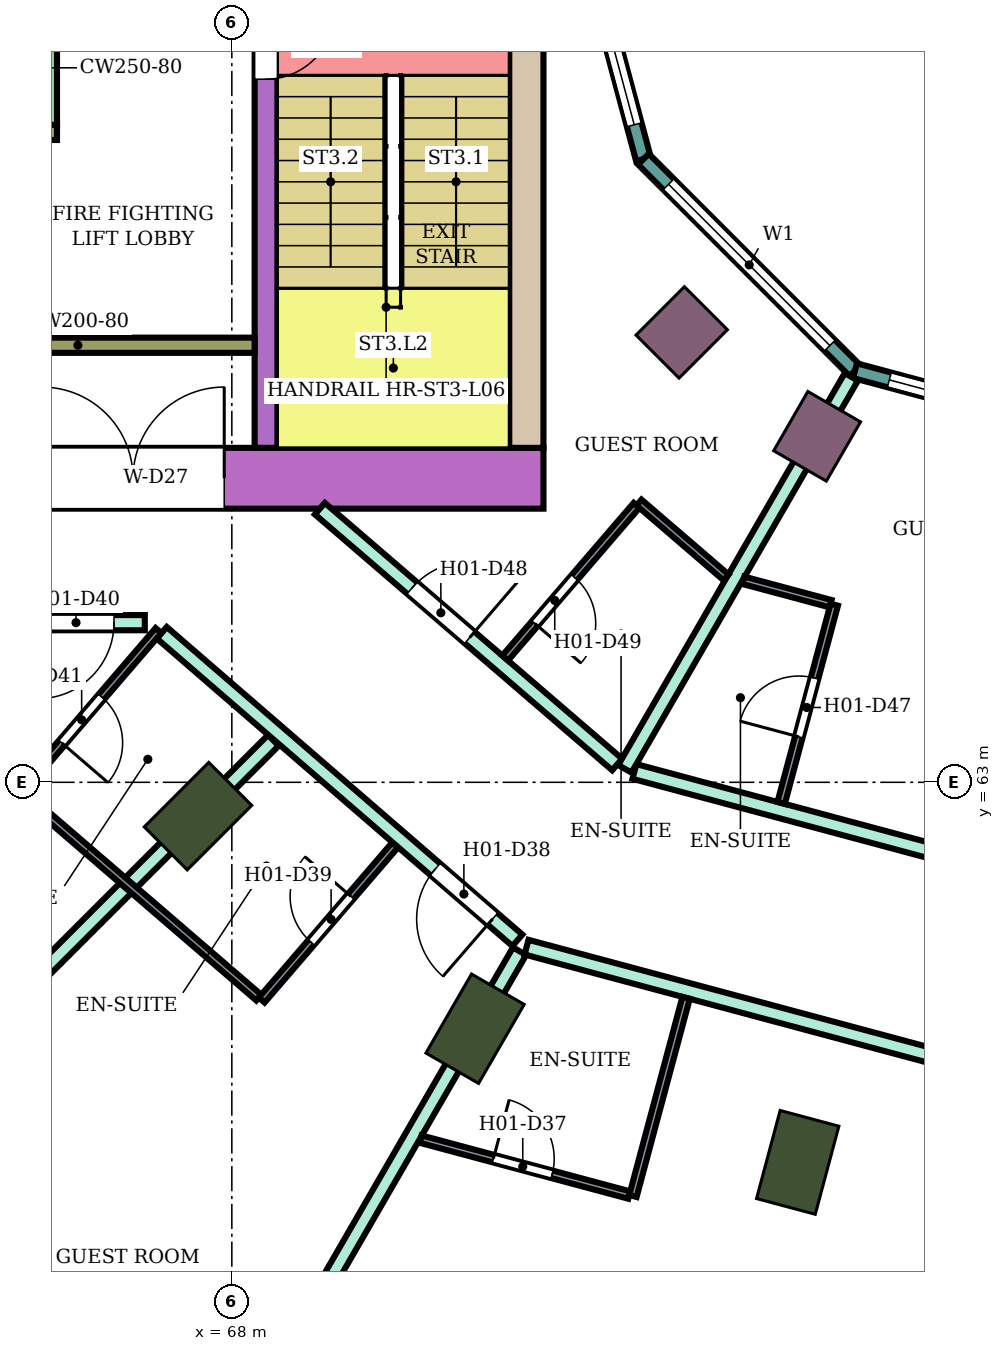
"""IFC4 building model, lengths in metres.
Left out: names, types, materials, properties, quantities, classifications, styles, units other than length and angle.
Written with IfcOpenShell. Run it as: python <this file> out.ifc"""

import sys

from ifc_helpers import new_model, si_unit, direction, frame, frame_2d, origin, origin_2d, place, context, subcontext, project, spatial, rectangle, extrude, element, fill, save


model = new_model("IFC4")
c1 = context("Model", 3, precision=1e-05, world=origin(), true_north=direction((0.0, 1.0)))
c2 = subcontext(c1, "Body", "Model", "MODEL_VIEW")
j1 = project(units=[si_unit("LENGTHUNIT", "METRE"), si_unit("PLANEANGLEUNIT", "RADIAN")], contexts=[c1])
p1 = place(None, origin())
s1 = spatial("IfcSite", under=j1, at=p1, CompositionType="ELEMENT")
p2 = place(p1, origin())
s2 = spatial("IfcBuilding", under=s1, at=p2, CompositionType="ELEMENT")
p3 = place(p2, frame((0.0, 0.0, 32.6)))
s3 = spatial("IfcBuildingStorey", under=s2, at=p3, CompositionType="ELEMENT", Elevation=32.6)
for number, where, z_axis, x_axis in (
    (1, (67.555, 62.555, 0.0), (0.0, 0.0, 1.0), (-0.707, -0.707, 0.0)),
    (2, (71.2, 59.758, 0.0), (0.0, 0.0, 1.0), (-0.5, -0.866, 0.0)),
    (3, (75.445, 58.0, 0.0), (0.0, 0.0, 1.0), (-0.259, -0.966, 0.0)),
):
    element("IfcColumn", number, at=place(p3, frame(where, z_axis=z_axis, x_axis=x_axis)), inside=s3, PredefinedType="COLUMN", context=c2, shape_type="SweptSolid", body=[
        extrude(rectangle(XDim=1.2, YDim=0.8, at=origin_2d()), origin(), (0.0, 0.0, 1.0), 3.8),
    ])
for number, where, z_axis, x_axis in (
    (4, (73.919, 68.919, 0.0), (0.0, 0.0, 1.0), (-0.707, -0.707, 0.0)),
    (5, (75.7, 67.552, 0.0), (0.0, 0.0, 1.0), (-0.5, -0.866, 0.0)),
):
    element("IfcColumn", number, at=place(p3, frame(where, z_axis=z_axis, x_axis=x_axis)), inside=s3, PredefinedType="COLUMN", context=c2, shape_type="SweptSolid", body=[
        extrude(rectangle(XDim=0.9, YDim=0.8, at=origin_2d()), origin(), (0.0, 0.0, 1.0), 3.8),
    ])
p4 = place(p3, frame((72.1, 67.0, 0.0), z_axis=(0.0, 0.0, 1.0), x_axis=(-1.0, 0.0, 0.0)))
e6 = element("IfcWall", 6, at=p4, inside=s3, PredefinedType="SHEAR", context=c2, shape_type="SweptSolid", body=[
    extrude(rectangle(XDim=14.7, YDim=0.8, at=frame_2d((7.35, 0.0))), origin(), (0.0, 0.0, 1.0), 3.48),
])
p5 = place(p4, frame((4.2, 0.0, 0.0)))
e7 = element("IfcOpeningElement", 7, at=p5, cuts=e6, PredefinedType="OPENING", context=c2, shape_type="SweptSolid", body=[
    extrude(rectangle(XDim=2.4, YDim=2.4, at=frame_2d((1.2, 1.2))), frame((0.0, 0.41, 0.0), z_axis=(0.0, -1.0, 0.0), x_axis=(1.0, 0.0, 0.0)), (0.0, 0.0, 1.0), 0.82),
])
p6 = place(p3, frame((71.875, 75.0, 0.0), z_axis=(0.0, 0.0, 1.0), x_axis=(0.0, -1.0, 0.0)))
e8 = element("IfcWall", 8, at=p6, inside=s3, PredefinedType="SHEAR", context=c2, shape_type="SweptSolid", body=[
    extrude(rectangle(XDim=7.6, YDim=0.45, at=frame_2d((3.8, 0.0))), origin(), (0.0, 0.0, 1.0), 3.48),
])
p7 = place(p3, frame((68.45, 75.0, 0.0), z_axis=(0.0, 0.0, 1.0), x_axis=(0.0, -1.0, 0.0)))
e9 = element("IfcWall", 9, at=p7, inside=s3, PredefinedType="SHEAR", context=c2, shape_type="SweptSolid", body=[
    extrude(rectangle(XDim=7.6, YDim=0.3, at=frame_2d((3.8, 0.0))), origin(), (0.0, 0.0, 1.0), 3.48),
])
p8 = place(p7, frame((1.85, 0.0, 0.0)))
e10 = element("IfcOpeningElement", 10, at=p8, cuts=e9, PredefinedType="OPENING", context=c2, shape_type="SweptSolid", body=[
    extrude(rectangle(XDim=0.9, YDim=2.1, at=frame_2d((0.45, 1.05))), frame((0.0, 0.16, 0.0), z_axis=(0.0, -1.0, 0.0), x_axis=(1.0, 0.0, 0.0)), (0.0, 0.0, 1.0), 0.32),
])
p9 = place(p3, frame((68.3, 68.75, 0.0), z_axis=(0.0, 0.0, 1.0), x_axis=(-1.0, 0.0, 0.0)))
e11 = element("IfcWall", 11, at=p9, inside=s3, PredefinedType="SHEAR", context=c2, shape_type="SweptSolid", body=[
    extrude(rectangle(XDim=4.65, YDim=0.2, at=frame_2d((2.325, 0.0))), origin(), (0.0, 0.0, 1.0), 3.48),
])
p10 = place(p3, frame((65.7, 71.55, 0.0), z_axis=(0.0, 0.0, 1.0), x_axis=(-1.0, 0.0, 0.0)))
e12 = element("IfcWall", 12, at=p10, inside=s3, PredefinedType="SHEAR", context=c2, shape_type="SweptSolid", body=[
    extrude(rectangle(XDim=2.05, YDim=0.2, at=frame_2d((1.025, 0.0))), origin(), (0.0, 0.0, 1.0), 3.48),
])
p11 = place(p3, frame((65.575, 73.15, 0.0), z_axis=(0.0, 0.0, 1.0), x_axis=(0.0, -1.0, 0.0)))
e13 = element("IfcWall", 13, at=p11, inside=s3, PredefinedType="SHEAR", context=c2, shape_type="SweptSolid", body=[
    extrude(rectangle(XDim=1.5, YDim=0.25, at=frame_2d((0.75, 0.0))), origin(), (0.0, 0.0, 1.0), 3.48),
])
p12 = place(p3, frame((72.396, 75.0, 0.0), z_axis=(0.0, 0.0, 1.0), x_axis=(0.258789828301, -0.965933654434, 0.0)))
e14 = element("IfcWall", 14, at=p12, inside=s3, PredefinedType="NOTDEFINED", context=c2, shape_type="SweptSolid", body=[
    extrude(rectangle(XDim=3.936, YDim=0.2, at=frame_2d((1.968, 0.0))), origin(), (0.0, 0.0, 1.0), 3.8),
])
p13 = place(p12, frame((0.468, 0.0, 0.9)))
e15 = element("IfcOpeningElement", 15, at=p13, cuts=e14, PredefinedType="OPENING", context=c2, shape_type="SweptSolid", body=[
    extrude(rectangle(XDim=3.0, YDim=2.3, at=frame_2d((1.5, 1.15))), frame((0.0, 0.11, 0.0), z_axis=(0.0, -1.0, 0.0), x_axis=(1.0, 0.0, 0.0)), (0.0, 0.0, 1.0), 0.22),
])
p14 = place(p3, frame((73.415, 71.198, 0.0), z_axis=(0.0, 0.0, 1.0), x_axis=(0.707106781187, -0.707106781187, 0.0)))
e16 = element("IfcWall", 16, at=p14, inside=s3, PredefinedType="NOTDEFINED", context=c2, shape_type="SweptSolid", body=[
    extrude(rectangle(XDim=3.936, YDim=0.2, at=frame_2d((1.968, 0.0))), origin(), (0.0, 0.0, 1.0), 3.8),
])
p15 = place(p14, frame((0.468, 0.0, 0.9)))
e17 = element("IfcOpeningElement", 17, at=p15, cuts=e16, PredefinedType="OPENING", context=c2, shape_type="SweptSolid", body=[
    extrude(rectangle(XDim=3.0, YDim=2.3, at=frame_2d((1.5, 1.15))), frame((0.0, 0.11, 0.0), z_axis=(0.0, -1.0, 0.0), x_axis=(1.0, 0.0, 0.0)), (0.0, 0.0, 1.0), 0.22),
])
p16 = place(p3, frame((76.198, 68.415, 0.0), z_axis=(0.0, 0.0, 1.0), x_axis=(0.965933654434, -0.258789828301, 0.0)))
e18 = element("IfcWall", 18, at=p16, inside=s3, PredefinedType="NOTDEFINED", context=c2, shape_type="SweptSolid", body=[
    extrude(rectangle(XDim=3.936, YDim=0.2, at=frame_2d((1.968, 0.0))), origin(), (0.0, 0.0, 1.0), 3.8),
])
p17 = place(p16, frame((0.468, 0.0, 0.9)))
e19 = element("IfcOpeningElement", 19, at=p17, cuts=e18, PredefinedType="OPENING", context=c2, shape_type="SweptSolid", body=[
    extrude(rectangle(XDim=3.0, YDim=2.3, at=frame_2d((1.5, 1.15))), frame((0.0, 0.11, 0.0), z_axis=(0.0, -1.0, 0.0), x_axis=(1.0, 0.0, 0.0)), (0.0, 0.0, 1.0), 0.22),
])
p18 = place(p3, frame((63.592, 58.599, 0.0), z_axis=(0.0, 0.0, 1.0), x_axis=(0.707228748718, 0.706984792613, 0.0)))
e20 = element("IfcWall", 20, at=p18, inside=s3, PredefinedType="PARTITIONING", context=c2, shape_type="SweptSolid", body=[
    extrude(rectangle(XDim=7.005, YDim=0.2, at=frame_2d((3.503, 0.0))), origin(), (0.0, 0.0, 1.0), 3.35),
])
p19 = place(p3, frame((65.2, 65.1, 0.0), z_axis=(0.0, 0.0, 1.0), x_axis=(1.0, 0.0, 0.0)))
e21 = element("IfcWall", 21, at=p19, inside=s3, PredefinedType="PARTITIONING", context=c2, shape_type="SweptSolid", body=[
    extrude(rectangle(XDim=1.655, YDim=0.2, at=frame_2d((0.828, 0.0))), origin(), (0.0, 0.0, 1.0), 3.35),
])
p20 = place(p19, frame((0.25, 0.0, 0.0)))
e22 = element("IfcOpeningElement", 22, at=p20, cuts=e21, PredefinedType="OPENING", context=c2, shape_type="SweptSolid", body=[
    extrude(rectangle(XDim=1.0, YDim=2.1, at=frame_2d((0.5, 1.05))), frame((0.0, 0.11, 0.0), z_axis=(0.0, -1.0, 0.0), x_axis=(1.0, 0.0, 0.0)), (0.0, 0.0, 1.0), 0.22),
])
p21 = place(p3, frame((67.078, 64.968, 0.0), z_axis=(0.0, 0.0, 1.0), x_axis=(0.756371089567, -0.654142778656, 0.0)))
e23 = element("IfcWall", 23, at=p21, inside=s3, PredefinedType="PARTITIONING", context=c2, shape_type="SweptSolid", body=[
    extrude(rectangle(XDim=6.185, YDim=0.2, at=frame_2d((3.093, 0.0))), origin(), (0.0, 0.0, 1.0), 3.35),
])
p22 = place(p21, frame((4.755, 0.0, 0.0)))
e24 = element("IfcOpeningElement", 24, at=p22, cuts=e23, PredefinedType="OPENING", context=c2, shape_type="SweptSolid", body=[
    extrude(rectangle(XDim=1.0, YDim=2.1, at=frame_2d((0.5, 1.05))), frame((0.0, 0.11, 0.0), z_axis=(0.0, -1.0, 0.0), x_axis=(1.0, 0.0, 0.0)), (0.0, 0.0, 1.0), 0.22),
])
p23 = place(p3, frame((67.096, 52.662, 0.0), z_axis=(0.0, 0.0, 1.0), x_axis=(0.500242450002, 0.865885379953, 0.0)))
e25 = element("IfcWall", 25, at=p23, inside=s3, PredefinedType="PARTITIONING", context=c2, shape_type="SweptSolid", body=[
    extrude(rectangle(XDim=9.374, YDim=0.2, at=frame_2d((4.687, 0.0))), origin(), (0.0, 0.0, 1.0), 3.35),
])
p24 = place(p3, frame((69.158, 66.6, 0.0), z_axis=(0.0, 0.0, 1.0), x_axis=(0.757976058094, -0.652282373943, 0.0)))
e26 = element("IfcWall", 26, at=p24, inside=s3, PredefinedType="PARTITIONING", context=c2, shape_type="SweptSolid", body=[
    extrude(rectangle(XDim=5.16, YDim=0.2, at=frame_2d((2.58, 0.0))), origin(), (0.0, 0.0, 1.0), 3.35),
])
p25 = place(p24, frame((1.6, 0.0, 0.0)))
e27 = element("IfcOpeningElement", 27, at=p25, cuts=e26, PredefinedType="OPENING", context=c2, shape_type="SweptSolid", body=[
    extrude(rectangle(XDim=1.0, YDim=2.1, at=frame_2d((0.5, 1.05))), frame((0.0, 0.11, 0.0), z_axis=(0.0, -1.0, 0.0), x_axis=(1.0, 0.0, 0.0)), (0.0, 0.0, 1.0), 0.22),
])
p26 = place(p3, frame((71.877, 60.831, 0.0), z_axis=(0.0, 0.0, 1.0), x_axis=(0.965852509869, -0.259092510851, 0.0)))
e28 = element("IfcWall", 28, at=p26, inside=s3, PredefinedType="PARTITIONING", context=c2, shape_type="SweptSolid", body=[
    extrude(rectangle(XDim=8.32, YDim=0.2, at=frame_2d((4.16, 0.0))), origin(), (0.0, 0.0, 1.0), 3.35),
])
p27 = place(p26, frame((6.86, 0.0, 0.0)))
e29 = element("IfcOpeningElement", 29, at=p27, cuts=e28, PredefinedType="OPENING", context=c2, shape_type="SweptSolid", body=[
    extrude(rectangle(XDim=1.0, YDim=2.1, at=frame_2d((0.5, 1.05))), frame((0.0, 0.11, 0.0), z_axis=(0.0, -1.0, 0.0), x_axis=(1.0, 0.0, 0.0)), (0.0, 0.0, 1.0), 0.22),
])
p28 = place(p3, frame((73.297, 63.143, 0.0), z_axis=(0.0, 0.0, 1.0), x_axis=(0.965859030528, -0.25906820173, 0.0)))
e30 = element("IfcWall", 30, at=p28, inside=s3, PredefinedType="PARTITIONING", context=c2, shape_type="SweptSolid", body=[
    extrude(rectangle(XDim=6.81, YDim=0.2, at=frame_2d((3.405, 0.0))), origin(), (0.0, 0.0, 1.0), 3.35),
])
p29 = place(p28, frame((5.39, 0.0, 0.0)))
e31 = element("IfcOpeningElement", 31, at=p29, cuts=e30, PredefinedType="OPENING", context=c2, shape_type="SweptSolid", body=[
    extrude(rectangle(XDim=1.0, YDim=2.1, at=frame_2d((0.5, 1.05))), frame((0.0, 0.11, 0.0), z_axis=(0.0, -1.0, 0.0), x_axis=(1.0, 0.0, 0.0)), (0.0, 0.0, 1.0), 0.22),
])
p30 = place(p3, frame((73.171, 63.177, 0.0), z_axis=(0.0, 0.0, 1.0), x_axis=(0.500257106344, 0.865876912472, 0.0)))
e32 = element("IfcWall", 32, at=p30, inside=s3, PredefinedType="PARTITIONING", context=c2, shape_type="SweptSolid", body=[
    extrude(rectangle(XDim=5.955, YDim=0.2, at=frame_2d((2.978, 0.0))), origin(), (0.0, 0.0, 1.0), 3.35),
])
p31 = place(p3, frame((65.242, 62.912, 0.0), z_axis=(0.0, 0.0, 1.0), x_axis=(0.652069888227, 0.758158862553, 0.0)))
e33 = element("IfcWall", 33, at=p31, inside=s3, PredefinedType="PARTITIONING", context=c2, shape_type="SweptSolid", body=[
    extrude(rectangle(XDim=2.75, YDim=0.1, at=frame_2d((1.375, 0.0))), origin(), (0.0, 0.0, 1.0), 3.35),
])
p32 = place(p31, frame((0.8, 0.0, 0.0)))
e34 = element("IfcOpeningElement", 34, at=p32, cuts=e33, PredefinedType="OPENING", context=c2, shape_type="SweptSolid", body=[
    extrude(rectangle(XDim=0.8, YDim=2.1, at=frame_2d((0.4, 1.05))), frame((0.0, 0.06, 0.0), z_axis=(0.0, -1.0, 0.0), x_axis=(1.0, 0.0, 0.0)), (0.0, 0.0, 1.0), 0.12),
])
p33 = place(p3, frame((65.209, 62.875, 0.0), z_axis=(0.0, 0.0, 1.0), x_axis=(0.757930378138, -0.652335451969, 0.0)))
e35 = element("IfcWall", 35, at=p33, inside=s3, PredefinedType="PARTITIONING", context=c2, shape_type="SweptSolid", body=[
    extrude(rectangle(XDim=4.15, YDim=0.1, at=frame_2d((2.075, 0.0))), origin(), (0.0, 0.0, 1.0), 3.35),
])
p34 = place(p3, frame((68.393, 60.135, 0.0), z_axis=(0.0, 0.0, 1.0), x_axis=(0.652061182569, 0.758166349944, 0.0)))
e36 = element("IfcWall", 36, at=p34, inside=s3, PredefinedType="PARTITIONING", context=c2, shape_type="SweptSolid", body=[
    extrude(rectangle(XDim=2.69, YDim=0.1, at=frame_2d((1.345, 0.0))), origin(), (0.0, 0.0, 1.0), 3.35),
])
p35 = place(p34, frame((1.0, 0.0, 0.0)))
e37 = element("IfcOpeningElement", 37, at=p35, cuts=e36, PredefinedType="OPENING", context=c2, shape_type="SweptSolid", body=[
    extrude(rectangle(XDim=0.8, YDim=2.1, at=frame_2d((0.4, 1.05))), frame((0.0, 0.06, 0.0), z_axis=(0.0, -1.0, 0.0), x_axis=(1.0, 0.0, 0.0)), (0.0, 0.0, 1.0), 0.12),
])
p36 = place(p3, frame((70.484, 58.305, 0.0), z_axis=(0.0, 0.0, 1.0), x_axis=(0.965904703781, -0.258897862512, 0.0)))
e38 = element("IfcWall", 38, at=p36, inside=s3, PredefinedType="PARTITIONING", context=c2, shape_type="SweptSolid", body=[
    extrude(rectangle(XDim=2.841, YDim=0.1, at=frame_2d((1.421, 0.0))), origin(), (0.0, 0.0, 1.0), 3.35),
])
p37 = place(p36, frame((0.99, 0.0, 0.0)))
e39 = element("IfcOpeningElement", 39, at=p37, cuts=e38, PredefinedType="OPENING", context=c2, shape_type="SweptSolid", body=[
    extrude(rectangle(XDim=0.8, YDim=2.1, at=frame_2d((0.4, 1.05))), frame((0.0, 0.06, 0.0), z_axis=(0.0, -1.0, 0.0), x_axis=(1.0, 0.0, 0.0)), (0.0, 0.0, 1.0), 0.12),
])
p38 = place(p3, frame((71.596, 64.635, 0.0), z_axis=(0.0, 0.0, 1.0), x_axis=(0.652285007511, 0.757973791748, 0.0)))
e40 = element("IfcWall", 40, at=p38, inside=s3, PredefinedType="PARTITIONING", context=c2, shape_type="SweptSolid", body=[
    extrude(rectangle(XDim=2.65, YDim=0.1, at=frame_2d((1.325, 0.0))), origin(), (0.0, 0.0, 1.0), 3.35),
])
p39 = place(p38, frame((0.6, 0.0, 0.0)))
e41 = element("IfcOpeningElement", 41, at=p39, cuts=e40, PredefinedType="OPENING", context=c2, shape_type="SweptSolid", body=[
    extrude(rectangle(XDim=0.8, YDim=2.1, at=frame_2d((0.4, 1.05))), frame((0.0, 0.06, 0.0), z_axis=(0.0, -1.0, 0.0), x_axis=(1.0, 0.0, 0.0)), (0.0, 0.0, 1.0), 0.12),
])
p40 = place(p3, frame((73.277, 57.557, 0.0), z_axis=(0.0, 0.0, 1.0), x_axis=(0.258928960762, 0.965896367774, 0.0)))
e42 = element("IfcWall", 42, at=p40, inside=s3, PredefinedType="PARTITIONING", context=c2, shape_type="SweptSolid", body=[
    extrude(rectangle(XDim=2.699, YDim=0.1, at=frame_2d((1.35, 0.0))), origin(), (0.0, 0.0, 1.0), 3.35),
])
p41 = place(p3, frame((73.357, 66.681, 0.0), z_axis=(0.0, 0.0, 1.0), x_axis=(0.758263469747, -0.651948242154, 0.0)))
e43 = element("IfcWall", 43, at=p41, inside=s3, PredefinedType="PARTITIONING", context=c2, shape_type="SweptSolid", body=[
    extrude(rectangle(XDim=1.511, YDim=0.1, at=frame_2d((0.755, 0.0))), origin(), (0.0, 0.0, 1.0), 3.35),
])
p42 = place(p3, frame((74.729, 65.657, 0.0), z_axis=(0.0, 0.0, 1.0), x_axis=(0.965948051503, -0.258736085224, 0.0)))
e44 = element("IfcWall", 44, at=p42, inside=s3, PredefinedType="PARTITIONING", context=c2, shape_type="SweptSolid", body=[
    extrude(rectangle(XDim=1.189, YDim=0.1, at=frame_2d((0.594, 0.0))), origin(), (0.0, 0.0, 1.0), 3.35),
])
p43 = place(p3, frame((75.227, 62.729, 0.0), z_axis=(0.0, 0.0, 1.0), x_axis=(0.258945475746, 0.965891940432, 0.0)))
e45 = element("IfcWall", 45, at=p43, inside=s3, PredefinedType="PARTITIONING", context=c2, shape_type="SweptSolid", body=[
    extrude(rectangle(XDim=2.7, YDim=0.1, at=frame_2d((1.35, 0.0))), origin(), (0.0, 0.0, 1.0), 3.35),
])
p44 = place(p43, frame((0.9, 0.0, 0.0)))
e46 = element("IfcOpeningElement", 46, at=p44, cuts=e45, PredefinedType="OPENING", context=c2, shape_type="SweptSolid", body=[
    extrude(rectangle(XDim=0.8, YDim=2.1, at=frame_2d((0.4, 1.05))), frame((0.0, 0.06, 0.0), z_axis=(0.0, -1.0, 0.0), x_axis=(1.0, 0.0, 0.0)), (0.0, 0.0, 1.0), 0.12),
])
p45 = place(p13, origin())
e47 = element("IfcWindow", 47, at=p45, inside=s3, PartitioningType="SINGLE_PANEL", PredefinedType="WINDOW", context=c2, shape_type="SweptSolid", body=[
    extrude(rectangle(XDim=3.0, YDim=2.3, at=frame_2d((1.5, 1.15))), frame((0.0, 0.03, 0.0), z_axis=(0.0, -1.0, 0.0), x_axis=(1.0, 0.0, 0.0)), (0.0, 0.0, 1.0), 0.06),
])
fill(e15, e47)
p46 = place(p15, origin())
e48 = element("IfcWindow", 48, at=p46, inside=s3, PartitioningType="SINGLE_PANEL", PredefinedType="WINDOW", context=c2, shape_type="SweptSolid", body=[
    extrude(rectangle(XDim=3.0, YDim=2.3, at=frame_2d((1.5, 1.15))), frame((0.0, 0.03, 0.0), z_axis=(0.0, -1.0, 0.0), x_axis=(1.0, 0.0, 0.0)), (0.0, 0.0, 1.0), 0.06),
])
fill(e17, e48)
p47 = place(p17, origin())
e49 = element("IfcWindow", 49, at=p47, inside=s3, PartitioningType="SINGLE_PANEL", PredefinedType="WINDOW", context=c2, shape_type="SweptSolid", body=[
    extrude(rectangle(XDim=3.0, YDim=2.3, at=frame_2d((1.5, 1.15))), frame((0.0, 0.03, 0.0), z_axis=(0.0, -1.0, 0.0), x_axis=(1.0, 0.0, 0.0)), (0.0, 0.0, 1.0), 0.06),
])
fill(e19, e49)
p48 = place(p37, origin())
e50 = element("IfcDoor", 50, at=p48, inside=s3, OperationType="SINGLE_SWING_LEFT", PredefinedType="DOOR", context=c2, shape_type="SweptSolid", body=[
    extrude(rectangle(XDim=0.8, YDim=2.1, at=frame_2d((0.4, 1.05))), frame((0.0, 0.025, 0.0), z_axis=(0.0, -1.0, 0.0), x_axis=(1.0, 0.0, 0.0)), (0.0, 0.0, 1.0), 0.05),
])
fill(e39, e50)
p49 = place(p22, frame((1.0, 0.0, 0.0), z_axis=(0.0, 0.0, 1.0), x_axis=(-1.0, 0.0, 0.0)))
e51 = element("IfcDoor", 51, at=p49, inside=s3, OperationType="SINGLE_SWING_LEFT", PredefinedType="DOOR", context=c2, shape_type="SweptSolid", body=[
    extrude(rectangle(XDim=1.0, YDim=2.1, at=frame_2d((0.5, 1.05))), frame((0.0, 0.025, 0.0), z_axis=(0.0, -1.0, 0.0), x_axis=(1.0, 0.0, 0.0)), (0.0, 0.0, 1.0), 0.05),
])
fill(e24, e51)
p50 = place(p35, origin())
e52 = element("IfcDoor", 52, at=p50, inside=s3, OperationType="SINGLE_SWING_RIGHT", PredefinedType="DOOR", context=c2, shape_type="SweptSolid", body=[
    extrude(rectangle(XDim=0.8, YDim=2.1, at=frame_2d((0.4, 1.05))), frame((0.0, 0.025, 0.0), z_axis=(0.0, -1.0, 0.0), x_axis=(1.0, 0.0, 0.0)), (0.0, 0.0, 1.0), 0.05),
])
fill(e37, e52)
p51 = place(p20, frame((1.0, 0.0, 0.0), z_axis=(0.0, 0.0, 1.0), x_axis=(-1.0, 0.0, 0.0)))
e53 = element("IfcDoor", 53, at=p51, inside=s3, OperationType="SINGLE_SWING_RIGHT", PredefinedType="DOOR", context=c2, shape_type="SweptSolid", body=[
    extrude(rectangle(XDim=1.0, YDim=2.1, at=frame_2d((0.5, 1.05))), frame((0.0, 0.025, 0.0), z_axis=(0.0, -1.0, 0.0), x_axis=(1.0, 0.0, 0.0)), (0.0, 0.0, 1.0), 0.05),
])
fill(e22, e53)
p52 = place(p32, frame((0.8, 0.0, 0.0), z_axis=(0.0, 0.0, 1.0), x_axis=(-1.0, 0.0, 0.0)))
e54 = element("IfcDoor", 54, at=p52, inside=s3, OperationType="SINGLE_SWING_RIGHT", PredefinedType="DOOR", context=c2, shape_type="SweptSolid", body=[
    extrude(rectangle(XDim=0.8, YDim=2.1, at=frame_2d((0.4, 1.05))), frame((0.0, 0.025, 0.0), z_axis=(0.0, -1.0, 0.0), x_axis=(1.0, 0.0, 0.0)), (0.0, 0.0, 1.0), 0.05),
])
fill(e34, e54)
p53 = place(p44, origin())
e55 = element("IfcDoor", 55, at=p53, inside=s3, OperationType="SINGLE_SWING_LEFT", PredefinedType="DOOR", context=c2, shape_type="SweptSolid", body=[
    extrude(rectangle(XDim=0.8, YDim=2.1, at=frame_2d((0.4, 1.05))), frame((0.0, 0.025, 0.0), z_axis=(0.0, -1.0, 0.0), x_axis=(1.0, 0.0, 0.0)), (0.0, 0.0, 1.0), 0.05),
])
fill(e46, e55)
p54 = place(p25, origin())
e56 = element("IfcDoor", 56, at=p54, inside=s3, OperationType="SINGLE_SWING_RIGHT", PredefinedType="DOOR", context=c2, shape_type="SweptSolid", body=[
    extrude(rectangle(XDim=1.0, YDim=2.1, at=frame_2d((0.5, 1.05))), frame((0.0, 0.025, 0.0), z_axis=(0.0, -1.0, 0.0), x_axis=(1.0, 0.0, 0.0)), (0.0, 0.0, 1.0), 0.05),
])
fill(e27, e56)
p55 = place(p39, frame((0.8, 0.0, 0.0), z_axis=(0.0, 0.0, 1.0), x_axis=(-1.0, 0.0, 0.0)))
e57 = element("IfcDoor", 57, at=p55, inside=s3, OperationType="SINGLE_SWING_RIGHT", PredefinedType="DOOR", context=c2, shape_type="SweptSolid", body=[
    extrude(rectangle(XDim=0.8, YDim=2.1, at=frame_2d((0.4, 1.05))), frame((0.0, 0.025, 0.0), z_axis=(0.0, -1.0, 0.0), x_axis=(1.0, 0.0, 0.0)), (0.0, 0.0, 1.0), 0.05),
])
fill(e41, e57)
p56 = place(p8, origin())
e58 = element("IfcDoor", 58, at=p56, inside=s3, OperationType="SINGLE_SWING_LEFT", PredefinedType="DOOR", context=c2, shape_type="SweptSolid", body=[
    extrude(rectangle(XDim=0.9, YDim=2.1, at=frame_2d((0.45, 1.05))), frame((0.0, 0.025, 0.0), z_axis=(0.0, -1.0, 0.0), x_axis=(1.0, 0.0, 0.0)), (0.0, 0.0, 1.0), 0.05),
])
fill(e10, e58)
p57 = place(p5, frame((2.4, 0.0, 0.0), z_axis=(0.0, 0.0, 1.0), x_axis=(-1.0, 0.0, 0.0)))
e59 = element("IfcDoor", 59, at=p57, inside=s3, OperationType="DOUBLE_DOOR_SINGLE_SWING", PredefinedType="DOOR", context=c2, shape_type="SweptSolid", body=[
    extrude(rectangle(XDim=2.4, YDim=2.4, at=frame_2d((1.2, 1.2))), frame((0.0, 0.025, 0.0), z_axis=(0.0, -1.0, 0.0), x_axis=(1.0, 0.0, 0.0)), (0.0, 0.0, 1.0), 0.05),
])
fill(e7, e59)
save(model, sys.argv[1])
